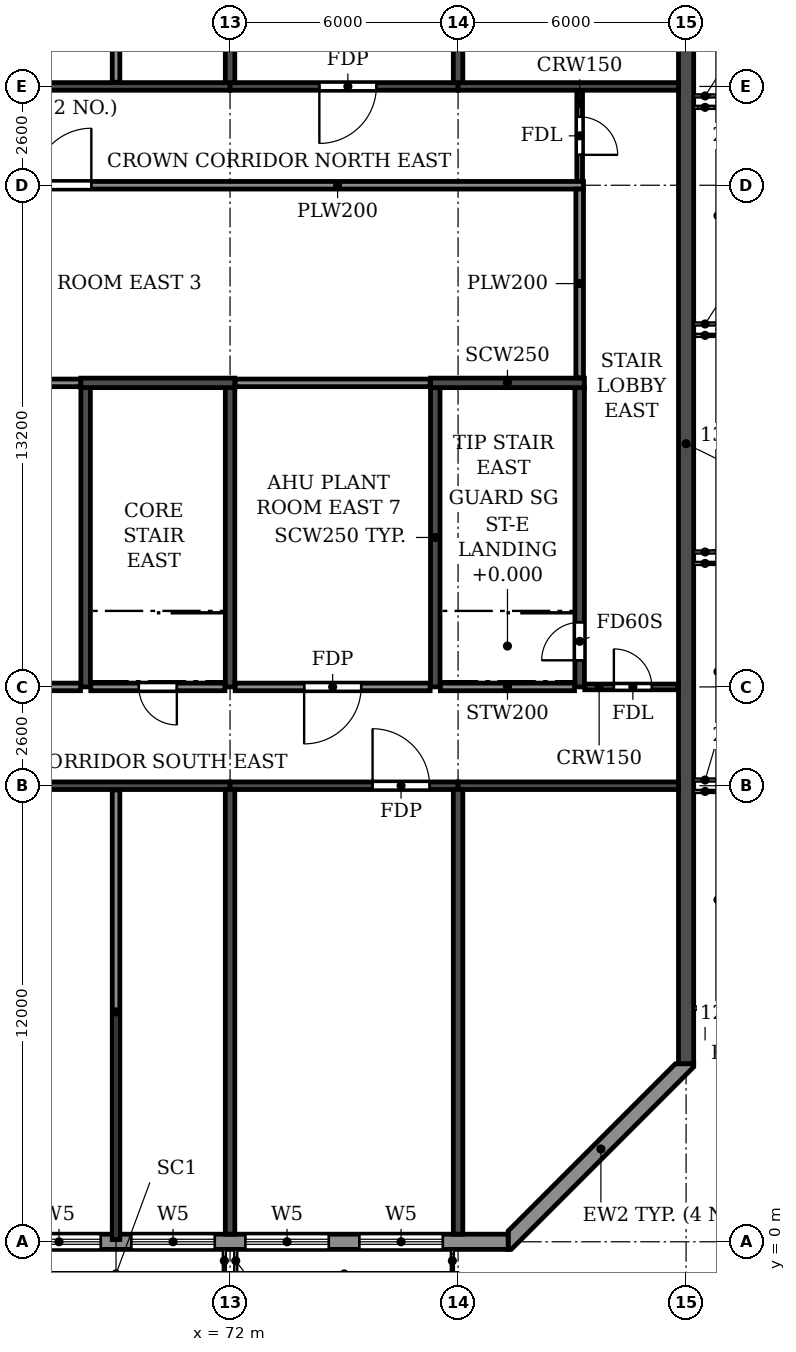
"""IFC4 building model, lengths in metres.
Left out: names, types, materials, properties, quantities, classifications, styles, units other than length and angle.
Written with IfcOpenShell. Run it as: python <this file> out.ifc"""

import sys

from ifc_helpers import new_model, si_unit, direction, frame, frame_2d, origin, place, context, subcontext, project, spatial, polyline, rectangle, outline, extrude, element, fill, save


model = new_model("IFC4")
c1 = context("Model", 3, precision=1e-05, world=origin(), true_north=direction((0.0, 1.0)))
c2 = subcontext(c1, "Body", "Model", "MODEL_VIEW")
j1 = project(units=[si_unit("LENGTHUNIT", "METRE"), si_unit("PLANEANGLEUNIT", "RADIAN")], contexts=[c1])
p1 = place(None, origin())
s1 = spatial("IfcSite", under=j1, at=p1, CompositionType="ELEMENT")
p2 = place(p1, origin())
s2 = spatial("IfcBuilding", under=s1, at=p2, CompositionType="ELEMENT")
p3 = place(p2, frame((0.0, 0.0, 282.3)))
s3 = spatial("IfcBuildingStorey", under=s2, at=p3, CompositionType="ELEMENT", Elevation=282.3)
p4 = place(p3, frame((72.0, 0.2, 0.0), z_axis=(0.0, 0.0, 1.0), x_axis=(0.0, 1.0, 0.0)))
e1 = element("IfcWall", 1, at=p4, inside=s3, PredefinedType="SHEAR", context=c2, shape_type="SweptSolid", body=[
    extrude(rectangle(XDim=11.7, YDim=0.25, at=frame_2d((5.85, 0.0))), origin(), (0.0, 0.0, 1.0), 3.05),
])
p5 = place(p3, frame((72.0, 30.5, 0.0), z_axis=(0.0, 0.0, 1.0), x_axis=(0.0, 1.0, 0.0)))
e2 = element("IfcWall", 2, at=p5, inside=s3, PredefinedType="SHEAR", context=c2, shape_type="SweptSolid", body=[
    extrude(rectangle(XDim=10.5, YDim=0.25, at=frame_2d((5.25, 0.0))), origin(), (0.0, 0.0, 1.0), 3.05),
])
p6 = place(p3, frame((78.0, 0.2, 0.0), z_axis=(0.0, 0.0, 1.0), x_axis=(0.0, 1.0, 0.0)))
e3 = element("IfcWall", 3, at=p6, inside=s3, PredefinedType="SHEAR", context=c2, shape_type="SweptSolid", body=[
    extrude(rectangle(XDim=11.7, YDim=0.25, at=frame_2d((5.85, 0.0))), origin(), (0.0, 0.0, 1.0), 3.05),
])
p7 = place(p3, frame((78.0, 30.5, 0.0), z_axis=(0.0, 0.0, 1.0), x_axis=(0.0, 1.0, 0.0)))
e4 = element("IfcWall", 4, at=p7, inside=s3, PredefinedType="SHEAR", context=c2, shape_type="SweptSolid", body=[
    extrude(rectangle(XDim=10.5, YDim=0.25, at=frame_2d((5.25, 0.0))), origin(), (0.0, 0.0, 1.0), 3.05),
])
p8 = place(p3, frame((84.0, 4.683, 0.0), z_axis=(0.0, 0.0, 1.0), x_axis=(0.0, 1.0, 0.0)))
e5 = element("IfcWall", 5, at=p8, inside=s3, PredefinedType="SHEAR", context=c2, shape_type="SweptSolid", body=[
    extrude(rectangle(XDim=31.834, YDim=0.4, at=frame_2d((15.917, 0.0))), origin(), (0.0, 0.0, 1.0), 3.05),
])
p9 = place(p3, frame((66.0, 12.0, 0.0), z_axis=(0.0, 0.0, 1.0), x_axis=(1.0, 0.0, 0.0)))
e6 = element("IfcWall", 6, at=p9, inside=s3, PredefinedType="SHEAR", context=c2, shape_type="SweptSolid", body=[
    extrude(rectangle(XDim=6.0, YDim=0.2, at=frame_2d((3.0, 0.0))), origin(), (0.0, 0.0, 1.0), 2.45),
])
p10 = place(p3, frame((72.0, 12.0, 0.0), z_axis=(0.0, 0.0, 1.0), x_axis=(1.0, 0.0, 0.0)))
e7 = element("IfcWall", 7, at=p10, inside=s3, PredefinedType="SHEAR", context=c2, shape_type="SweptSolid", body=[
    extrude(rectangle(XDim=6.0, YDim=0.2, at=frame_2d((3.0, 0.0))), origin(), (0.0, 0.0, 1.0), 2.45),
])
p11 = place(p10, frame((3.75, 0.0, 0.0)))
e8 = element("IfcOpeningElement", 8, at=p11, cuts=e7, PredefinedType="OPENING", context=c2, shape_type="SweptSolid", body=[
    extrude(rectangle(XDim=1.5, YDim=2.1, at=frame_2d((0.75, 1.05))), frame((0.0, 0.11, 0.0), z_axis=(0.0, -1.0, 0.0), x_axis=(1.0, 0.0, 0.0)), (0.0, 0.0, 1.0), 0.22),
])
p12 = place(p3, frame((78.0, 12.0, 0.0), z_axis=(0.0, 0.0, 1.0), x_axis=(1.0, 0.0, 0.0)))
e9 = element("IfcWall", 9, at=p12, inside=s3, PredefinedType="SHEAR", context=c2, shape_type="SweptSolid", body=[
    extrude(rectangle(XDim=5.8, YDim=0.2, at=frame_2d((2.9, 0.0))), origin(), (0.0, 0.0, 1.0), 2.45),
])
p13 = place(p3, frame((66.0, 30.4, 0.0), z_axis=(0.0, 0.0, 1.0), x_axis=(1.0, 0.0, 0.0)))
e10 = element("IfcWall", 10, at=p13, inside=s3, PredefinedType="SHEAR", context=c2, shape_type="SweptSolid", body=[
    extrude(rectangle(XDim=6.0, YDim=0.2, at=frame_2d((3.0, 0.0))), origin(), (0.0, 0.0, 1.0), 2.45),
])
p14 = place(p3, frame((72.0, 30.4, 0.0), z_axis=(0.0, 0.0, 1.0), x_axis=(1.0, 0.0, 0.0)))
e11 = element("IfcWall", 11, at=p14, inside=s3, PredefinedType="SHEAR", context=c2, shape_type="SweptSolid", body=[
    extrude(rectangle(XDim=6.0, YDim=0.2, at=frame_2d((3.0, 0.0))), origin(), (0.0, 0.0, 1.0), 2.45),
])
p15 = place(p14, frame((2.35, 0.0, 0.0)))
e12 = element("IfcOpeningElement", 12, at=p15, cuts=e11, PredefinedType="OPENING", context=c2, shape_type="SweptSolid", body=[
    extrude(rectangle(XDim=1.5, YDim=2.1, at=frame_2d((0.75, 1.05))), frame((0.0, 0.11, 0.0), z_axis=(0.0, -1.0, 0.0), x_axis=(1.0, 0.0, 0.0)), (0.0, 0.0, 1.0), 0.22),
])
p16 = place(p3, frame((78.0, 30.4, 0.0), z_axis=(0.0, 0.0, 1.0), x_axis=(1.0, 0.0, 0.0)))
e13 = element("IfcWall", 13, at=p16, inside=s3, PredefinedType="SHEAR", context=c2, shape_type="SweptSolid", body=[
    extrude(rectangle(XDim=5.8, YDim=0.2, at=frame_2d((2.9, 0.0))), origin(), (0.0, 0.0, 1.0), 2.45),
])
p17 = place(p3, frame((77.4, 14.6, 0.0), z_axis=(0.0, 0.0, 1.0), x_axis=(0.0, 1.0, 0.0)))
e14 = element("IfcWall", 14, at=p17, inside=s3, PredefinedType="SOLIDWALL", context=c2, shape_type="SweptSolid", body=[
    extrude(rectangle(XDim=7.875, YDim=0.25, at=frame_2d((3.938, 0.0))), origin(), (0.0, 0.0, 1.0), 3.05),
])
p18 = place(p3, frame((81.2, 14.6, 0.0), z_axis=(0.0, 0.0, 1.0), x_axis=(0.0, 1.0, 0.0)))
e15 = element("IfcWall", 15, at=p18, inside=s3, PredefinedType="SOLIDWALL", context=c2, shape_type="SweptSolid", body=[
    extrude(rectangle(XDim=7.875, YDim=0.25, at=frame_2d((3.938, 0.0))), origin(), (0.0, 0.0, 1.0), 3.05),
])
p19 = place(p18, frame((0.7, 0.0, 0.0)))
e16 = element("IfcOpeningElement", 16, at=p19, cuts=e15, PredefinedType="OPENING", context=c2, shape_type="SweptSolid", body=[
    extrude(rectangle(XDim=1.0, YDim=2.1, at=frame_2d((0.5, 1.05))), frame((0.0, 0.135, 0.0), z_axis=(0.0, -1.0, 0.0), x_axis=(1.0, 0.0, 0.0)), (0.0, 0.0, 1.0), 0.27),
])
p20 = place(p3, frame((77.275, 22.6, 0.0), z_axis=(0.0, 0.0, 1.0), x_axis=(1.0, 0.0, 0.0)))
e17 = element("IfcWall", 17, at=p20, inside=s3, PredefinedType="SOLIDWALL", context=c2, shape_type="SweptSolid", body=[
    extrude(rectangle(XDim=4.05, YDim=0.25, at=frame_2d((2.025, 0.0))), origin(), (0.0, 0.0, 1.0), 3.05),
])
for number, where, z_axis, x_axis in (
    (18, (68.2, 14.6, 0.0), (0.0, 0.0, 1.0), (0.0, 1.0, 0.0)),
    (19, (72.0, 14.6, 0.0), (0.0, 0.0, 1.0), (0.0, 1.0, 0.0)),
):
    element("IfcWall", number, at=place(p3, frame(where, z_axis=z_axis, x_axis=x_axis)), inside=s3, PredefinedType="SOLIDWALL", context=c2, shape_type="SweptSolid", body=[
        extrude(rectangle(XDim=7.875, YDim=0.25, at=frame_2d((3.938, 0.0))), origin(), (0.0, 0.0, 1.0), 3.05),
    ])
p21 = place(p3, frame((68.075, 22.6, 0.0), z_axis=(0.0, 0.0, 1.0), x_axis=(1.0, 0.0, 0.0)))
e20 = element("IfcWall", 20, at=p21, inside=s3, PredefinedType="SOLIDWALL", context=c2, shape_type="SweptSolid", body=[
    extrude(rectangle(XDim=4.05, YDim=0.25, at=frame_2d((2.025, 0.0))), origin(), (0.0, 0.0, 1.0), 3.05),
])
p22 = place(p3, frame((53.8, 0.0, 0.0), z_axis=(0.0, 0.0, 1.0), x_axis=(1.0, 0.0, 0.0)))
e21 = element("IfcWall", 21, at=p22, inside=s3, PredefinedType="STANDARD", context=c2, shape_type="SweptSolid", body=[
    extrude(rectangle(XDim=25.517, YDim=0.4, at=frame_2d((12.759, 0.0))), origin(), (0.0, 0.0, 1.0), 3.05),
])
p23 = place(p22, frame((0.6, 0.0, 0.6)))
e22 = element("IfcOpeningElement", 22, at=p23, cuts=e21, PredefinedType="OPENING", context=c2, shape_type="SweptSolid", body=[
    extrude(rectangle(XDim=2.2, YDim=2.4, at=frame_2d((1.1, 1.2))), frame((0.0, 0.21, 0.0), z_axis=(0.0, -1.0, 0.0), x_axis=(1.0, 0.0, 0.0)), (0.0, 0.0, 1.0), 0.42),
])
p24 = place(p22, frame((3.6, 0.0, 0.6)))
e23 = element("IfcOpeningElement", 23, at=p24, cuts=e21, PredefinedType="OPENING", context=c2, shape_type="SweptSolid", body=[
    extrude(rectangle(XDim=2.2, YDim=2.4, at=frame_2d((1.1, 1.2))), frame((0.0, 0.21, 0.0), z_axis=(0.0, -1.0, 0.0), x_axis=(1.0, 0.0, 0.0)), (0.0, 0.0, 1.0), 0.42),
])
p25 = place(p22, frame((6.6, 0.0, 0.6)))
e24 = element("IfcOpeningElement", 24, at=p25, cuts=e21, PredefinedType="OPENING", context=c2, shape_type="SweptSolid", body=[
    extrude(rectangle(XDim=2.2, YDim=2.4, at=frame_2d((1.1, 1.2))), frame((0.0, 0.21, 0.0), z_axis=(0.0, -1.0, 0.0), x_axis=(1.0, 0.0, 0.0)), (0.0, 0.0, 1.0), 0.42),
])
p26 = place(p22, frame((9.6, 0.0, 0.6)))
e25 = element("IfcOpeningElement", 25, at=p26, cuts=e21, PredefinedType="OPENING", context=c2, shape_type="SweptSolid", body=[
    extrude(rectangle(XDim=2.2, YDim=2.4, at=frame_2d((1.1, 1.2))), frame((0.0, 0.21, 0.0), z_axis=(0.0, -1.0, 0.0), x_axis=(1.0, 0.0, 0.0)), (0.0, 0.0, 1.0), 0.42),
])
p27 = place(p22, frame((12.6, 0.0, 0.6)))
e26 = element("IfcOpeningElement", 26, at=p27, cuts=e21, PredefinedType="OPENING", context=c2, shape_type="SweptSolid", body=[
    extrude(rectangle(XDim=2.2, YDim=2.4, at=frame_2d((1.1, 1.2))), frame((0.0, 0.21, 0.0), z_axis=(0.0, -1.0, 0.0), x_axis=(1.0, 0.0, 0.0)), (0.0, 0.0, 1.0), 0.42),
])
p28 = place(p22, frame((15.6, 0.0, 0.6)))
e27 = element("IfcOpeningElement", 27, at=p28, cuts=e21, PredefinedType="OPENING", context=c2, shape_type="SweptSolid", body=[
    extrude(rectangle(XDim=2.2, YDim=2.4, at=frame_2d((1.1, 1.2))), frame((0.0, 0.21, 0.0), z_axis=(0.0, -1.0, 0.0), x_axis=(1.0, 0.0, 0.0)), (0.0, 0.0, 1.0), 0.42),
])
p29 = place(p22, frame((18.6, 0.0, 0.6)))
e28 = element("IfcOpeningElement", 28, at=p29, cuts=e21, PredefinedType="OPENING", context=c2, shape_type="SweptSolid", body=[
    extrude(rectangle(XDim=2.2, YDim=2.4, at=frame_2d((1.1, 1.2))), frame((0.0, 0.21, 0.0), z_axis=(0.0, -1.0, 0.0), x_axis=(1.0, 0.0, 0.0)), (0.0, 0.0, 1.0), 0.42),
])
p30 = place(p22, frame((21.6, 0.0, 0.6)))
e29 = element("IfcOpeningElement", 29, at=p30, cuts=e21, PredefinedType="OPENING", context=c2, shape_type="SweptSolid", body=[
    extrude(rectangle(XDim=2.2, YDim=2.4, at=frame_2d((1.1, 1.2))), frame((0.0, 0.21, 0.0), z_axis=(0.0, -1.0, 0.0), x_axis=(1.0, 0.0, 0.0)), (0.0, 0.0, 1.0), 0.42),
])
p31 = place(p3, origin())
e30 = element("IfcWall", 30, at=p31, inside=s3, PredefinedType="STANDARD", context=c2, shape_type="SweptSolid", body=[
    extrude(outline(polyline([(79.317, -0.2), (79.4, -0.2), (84.2, 4.6), (84.2, 4.683), (83.717, 4.683), (79.317, 0.283), (79.317, -0.2)])), origin(), (0.0, 0.0, 1.0), 3.05),
])
p32 = place(p3, frame((81.335, 14.6, 0.0), z_axis=(0.0, 0.0, 1.0), x_axis=(1.0, 0.0, 0.0)))
e31 = element("IfcWall", 31, at=p32, inside=s3, PredefinedType="PARTITIONING", context=c2, shape_type="SweptSolid", body=[
    extrude(rectangle(XDim=2.455, YDim=0.15, at=frame_2d((1.228, 0.0))), origin(), (0.0, 0.0, 1.0), 3.05),
])
p33 = place(p32, frame((0.765, 0.0, 0.0)))
e32 = element("IfcOpeningElement", 32, at=p33, cuts=e31, PredefinedType="OPENING", context=c2, shape_type="SweptSolid", body=[
    extrude(rectangle(XDim=1.0, YDim=2.1, at=frame_2d((0.5, 1.05))), frame((0.0, 0.085, 0.0), z_axis=(0.0, -1.0, 0.0), x_axis=(1.0, 0.0, 0.0)), (0.0, 0.0, 1.0), 0.17),
])
p34 = place(p3, frame((81.2, 27.9, 0.0), z_axis=(0.0, 0.0, 1.0), x_axis=(0.0, 1.0, 0.0)))
e33 = element("IfcWall", 33, at=p34, inside=s3, PredefinedType="PARTITIONING", context=c2, shape_type="SweptSolid", body=[
    extrude(rectangle(XDim=2.39, YDim=0.15, at=frame_2d((1.195, 0.0))), origin(), (0.0, 0.0, 1.0), 3.05),
])
p35 = place(p34, frame((0.7, 0.0, 0.0)))
e34 = element("IfcOpeningElement", 34, at=p35, cuts=e33, PredefinedType="OPENING", context=c2, shape_type="SweptSolid", body=[
    extrude(rectangle(XDim=1.0, YDim=2.1, at=frame_2d((0.5, 1.05))), frame((0.0, 0.085, 0.0), z_axis=(0.0, -1.0, 0.0), x_axis=(1.0, 0.0, 0.0)), (0.0, 0.0, 1.0), 0.17),
])
p36 = place(p3, frame((54.21, 14.6, 0.0), z_axis=(0.0, 0.0, 1.0), x_axis=(1.0, 0.0, 0.0)))
e35 = element("IfcWall", 35, at=p36, inside=s3, PredefinedType="PARTITIONING", context=c2, shape_type="SweptSolid", body=[
    extrude(rectangle(XDim=13.855, YDim=0.2, at=frame_2d((6.927, 0.0))), origin(), (0.0, 0.0, 1.0), 3.05),
])
p37 = place(p36, frame((6.14, 0.0, 0.0)))
e36 = element("IfcOpeningElement", 36, at=p37, cuts=e35, PredefinedType="OPENING", context=c2, shape_type="SweptSolid", body=[
    extrude(rectangle(XDim=1.5, YDim=2.1, at=frame_2d((0.75, 1.05))), frame((0.0, 0.11, 0.0), z_axis=(0.0, -1.0, 0.0), x_axis=(1.0, 0.0, 0.0)), (0.0, 0.0, 1.0), 0.22),
])
p38 = place(p3, frame((72.135, 14.6, 0.0), z_axis=(0.0, 0.0, 1.0), x_axis=(1.0, 0.0, 0.0)))
e37 = element("IfcWall", 37, at=p38, inside=s3, PredefinedType="PARTITIONING", context=c2, shape_type="SweptSolid", body=[
    extrude(rectangle(XDim=5.13, YDim=0.2, at=frame_2d((2.565, 0.0))), origin(), (0.0, 0.0, 1.0), 3.05),
])
p39 = place(p38, frame((1.815, 0.0, 0.0)))
e38 = element("IfcOpeningElement", 38, at=p39, cuts=e37, PredefinedType="OPENING", context=c2, shape_type="SweptSolid", body=[
    extrude(rectangle(XDim=1.5, YDim=2.1, at=frame_2d((0.75, 1.05))), frame((0.0, 0.11, 0.0), z_axis=(0.0, -1.0, 0.0), x_axis=(1.0, 0.0, 0.0)), (0.0, 0.0, 1.0), 0.22),
])
p40 = place(p3, frame((54.21, 22.6, 0.0), z_axis=(0.0, 0.0, 1.0), x_axis=(1.0, 0.0, 0.0)))
e39 = element("IfcWall", 39, at=p40, inside=s3, PredefinedType="PARTITIONING", context=c2, shape_type="SweptSolid", body=[
    extrude(rectangle(XDim=13.855, YDim=0.2, at=frame_2d((6.927, 0.0))), origin(), (0.0, 0.0, 1.0), 3.05),
])
p41 = place(p3, frame((72.135, 22.6, 0.0), z_axis=(0.0, 0.0, 1.0), x_axis=(1.0, 0.0, 0.0)))
e40 = element("IfcWall", 40, at=p41, inside=s3, PredefinedType="PARTITIONING", context=c2, shape_type="SweptSolid", body=[
    extrude(rectangle(XDim=5.13, YDim=0.2, at=frame_2d((2.565, 0.0))), origin(), (0.0, 0.0, 1.0), 3.05),
])
p42 = place(p3, frame((54.21, 27.8, 0.0), z_axis=(0.0, 0.0, 1.0), x_axis=(1.0, 0.0, 0.0)))
e41 = element("IfcWall", 41, at=p42, inside=s3, PredefinedType="PARTITIONING", context=c2, shape_type="SweptSolid", body=[
    extrude(rectangle(XDim=27.09, YDim=0.2, at=frame_2d((13.545, 0.0))), origin(), (0.0, 0.0, 1.0), 3.05),
])
p43 = place(p42, frame((12.64, 0.0, 0.0)))
e42 = element("IfcOpeningElement", 42, at=p43, cuts=e41, PredefinedType="OPENING", context=c2, shape_type="SweptSolid", body=[
    extrude(rectangle(XDim=1.5, YDim=2.1, at=frame_2d((0.75, 1.05))), frame((0.0, 0.11, 0.0), z_axis=(0.0, -1.0, 0.0), x_axis=(1.0, 0.0, 0.0)), (0.0, 0.0, 1.0), 0.22),
])
p44 = place(p3, frame((69.0, 0.06, 0.0), z_axis=(0.0, 0.0, 1.0), x_axis=(0.0, 1.0, 0.0)))
e43 = element("IfcWall", 43, at=p44, inside=s3, PredefinedType="PARTITIONING", context=c2, shape_type="SweptSolid", body=[
    extrude(rectangle(XDim=11.83, YDim=0.2, at=frame_2d((5.915, 0.0))), origin(), (0.0, 0.0, 1.0), 3.05),
])
p45 = place(p3, frame((69.0, 30.51, 0.0), z_axis=(0.0, 0.0, 1.0), x_axis=(0.0, 1.0, 0.0)))
e44 = element("IfcWall", 44, at=p45, inside=s3, PredefinedType="PARTITIONING", context=c2, shape_type="SweptSolid", body=[
    extrude(rectangle(XDim=10.63, YDim=0.2, at=frame_2d((5.315, 0.0))), origin(), (0.0, 0.0, 1.0), 3.05),
])
p46 = place(p3, frame((81.2, 22.735, 0.0), z_axis=(0.0, 0.0, 1.0), x_axis=(0.0, 1.0, 0.0)))
e45 = element("IfcWall", 45, at=p46, inside=s3, PredefinedType="PARTITIONING", context=c2, shape_type="SweptSolid", body=[
    extrude(rectangle(XDim=4.965, YDim=0.2, at=frame_2d((2.482, 0.0))), origin(), (0.0, 0.0, 1.0), 3.05),
])
p47 = place(p3, frame((68.335, 14.6, 0.0), z_axis=(0.0, 0.0, 1.0), x_axis=(1.0, 0.0, 0.0)))
e46 = element("IfcWall", 46, at=p47, inside=s3, PredefinedType="PARTITIONING", context=c2, shape_type="SweptSolid", body=[
    extrude(rectangle(XDim=3.53, YDim=0.2, at=frame_2d((1.765, 0.0))), origin(), (0.0, 0.0, 1.0), 3.05),
])
p48 = place(p47, frame((1.265, 0.0, 0.0)))
e47 = element("IfcOpeningElement", 47, at=p48, cuts=e46, PredefinedType="OPENING", context=c2, shape_type="SweptSolid", body=[
    extrude(rectangle(XDim=1.0, YDim=2.1, at=frame_2d((0.5, 1.05))), frame((0.0, 0.11, 0.0), z_axis=(0.0, -1.0, 0.0), x_axis=(1.0, 0.0, 0.0)), (0.0, 0.0, 1.0), 0.22),
])
p49 = place(p3, frame((77.535, 14.6, 0.0), z_axis=(0.0, 0.0, 1.0), x_axis=(1.0, 0.0, 0.0)))
e48 = element("IfcWall", 48, at=p49, inside=s3, PredefinedType="PARTITIONING", context=c2, shape_type="SweptSolid", body=[
    extrude(rectangle(XDim=3.53, YDim=0.2, at=frame_2d((1.765, 0.0))), origin(), (0.0, 0.0, 1.0), 3.05),
])
p50 = place(p27, origin())
e49 = element("IfcWindow", 49, at=p50, inside=s3, PartitioningType="TRIPLE_PANEL_HORIZONTAL", PredefinedType="WINDOW", context=c2, shape_type="SweptSolid", body=[
    extrude(rectangle(XDim=2.2, YDim=2.4, at=frame_2d((1.1, 1.2))), frame((0.0, 0.03, 0.0), z_axis=(0.0, -1.0, 0.0), x_axis=(1.0, 0.0, 0.0)), (0.0, 0.0, 1.0), 0.06),
])
fill(e26, e49)
p51 = place(p28, origin())
e50 = element("IfcWindow", 50, at=p51, inside=s3, PartitioningType="TRIPLE_PANEL_HORIZONTAL", PredefinedType="WINDOW", context=c2, shape_type="SweptSolid", body=[
    extrude(rectangle(XDim=2.2, YDim=2.4, at=frame_2d((1.1, 1.2))), frame((0.0, 0.03, 0.0), z_axis=(0.0, -1.0, 0.0), x_axis=(1.0, 0.0, 0.0)), (0.0, 0.0, 1.0), 0.06),
])
fill(e27, e50)
p52 = place(p29, origin())
e51 = element("IfcWindow", 51, at=p52, inside=s3, PartitioningType="TRIPLE_PANEL_HORIZONTAL", PredefinedType="WINDOW", context=c2, shape_type="SweptSolid", body=[
    extrude(rectangle(XDim=2.2, YDim=2.4, at=frame_2d((1.1, 1.2))), frame((0.0, 0.03, 0.0), z_axis=(0.0, -1.0, 0.0), x_axis=(1.0, 0.0, 0.0)), (0.0, 0.0, 1.0), 0.06),
])
fill(e28, e51)
p53 = place(p30, origin())
e52 = element("IfcWindow", 52, at=p53, inside=s3, PartitioningType="TRIPLE_PANEL_HORIZONTAL", PredefinedType="WINDOW", context=c2, shape_type="SweptSolid", body=[
    extrude(rectangle(XDim=2.2, YDim=2.4, at=frame_2d((1.1, 1.2))), frame((0.0, 0.03, 0.0), z_axis=(0.0, -1.0, 0.0), x_axis=(1.0, 0.0, 0.0)), (0.0, 0.0, 1.0), 0.06),
])
fill(e29, e52)
p54 = place(p43, origin())
e53 = element("IfcDoor", 53, at=p54, inside=s3, OperationType="DOUBLE_DOOR_SINGLE_SWING", PredefinedType="DOOR", context=c2, shape_type="SweptSolid", body=[
    extrude(rectangle(XDim=1.5, YDim=2.1, at=frame_2d((0.75, 1.05))), frame((0.0, 0.025, 0.0), z_axis=(0.0, -1.0, 0.0), x_axis=(1.0, 0.0, 0.0)), (0.0, 0.0, 1.0), 0.05),
])
fill(e42, e53)
p55 = place(p15, frame((1.5, 0.0, 0.0), z_axis=(0.0, 0.0, 1.0), x_axis=(-1.0, 0.0, 0.0)))
e54 = element("IfcDoor", 54, at=p55, inside=s3, OperationType="DOUBLE_DOOR_SINGLE_SWING", PredefinedType="DOOR", context=c2, shape_type="SweptSolid", body=[
    extrude(rectangle(XDim=1.5, YDim=2.1, at=frame_2d((0.75, 1.05))), frame((0.0, 0.025, 0.0), z_axis=(0.0, -1.0, 0.0), x_axis=(1.0, 0.0, 0.0)), (0.0, 0.0, 1.0), 0.05),
])
fill(e12, e54)
p56 = place(p39, frame((1.5, 0.0, 0.0), z_axis=(0.0, 0.0, 1.0), x_axis=(-1.0, 0.0, 0.0)))
e55 = element("IfcDoor", 55, at=p56, inside=s3, OperationType="DOUBLE_DOOR_SINGLE_SWING", PredefinedType="DOOR", context=c2, shape_type="SweptSolid", body=[
    extrude(rectangle(XDim=1.5, YDim=2.1, at=frame_2d((0.75, 1.05))), frame((0.0, 0.025, 0.0), z_axis=(0.0, -1.0, 0.0), x_axis=(1.0, 0.0, 0.0)), (0.0, 0.0, 1.0), 0.05),
])
fill(e38, e55)
p57 = place(p11, origin())
e56 = element("IfcDoor", 56, at=p57, inside=s3, OperationType="DOUBLE_DOOR_SINGLE_SWING", PredefinedType="DOOR", context=c2, shape_type="SweptSolid", body=[
    extrude(rectangle(XDim=1.5, YDim=2.1, at=frame_2d((0.75, 1.05))), frame((0.0, 0.025, 0.0), z_axis=(0.0, -1.0, 0.0), x_axis=(1.0, 0.0, 0.0)), (0.0, 0.0, 1.0), 0.05),
])
fill(e8, e56)
p58 = place(p19, origin())
e57 = element("IfcDoor", 57, at=p58, inside=s3, OperationType="SINGLE_SWING_LEFT", PredefinedType="DOOR", context=c2, shape_type="SweptSolid", body=[
    extrude(rectangle(XDim=1.0, YDim=2.1, at=frame_2d((0.5, 1.05))), frame((0.0, 0.025, 0.0), z_axis=(0.0, -1.0, 0.0), x_axis=(1.0, 0.0, 0.0)), (0.0, 0.0, 1.0), 0.05),
])
fill(e16, e57)
p59 = place(p35, frame((1.0, 0.0, 0.0), z_axis=(0.0, 0.0, 1.0), x_axis=(-1.0, 0.0, 0.0)))
e58 = element("IfcDoor", 58, at=p59, inside=s3, OperationType="SINGLE_SWING_RIGHT", PredefinedType="DOOR", context=c2, shape_type="SweptSolid", body=[
    extrude(rectangle(XDim=1.0, YDim=2.1, at=frame_2d((0.5, 1.05))), frame((0.0, 0.025, 0.0), z_axis=(0.0, -1.0, 0.0), x_axis=(1.0, 0.0, 0.0)), (0.0, 0.0, 1.0), 0.05),
])
fill(e34, e58)
p60 = place(p33, origin())
e59 = element("IfcDoor", 59, at=p60, inside=s3, OperationType="SINGLE_SWING_LEFT", PredefinedType="DOOR", context=c2, shape_type="SweptSolid", body=[
    extrude(rectangle(XDim=1.0, YDim=2.1, at=frame_2d((0.5, 1.05))), frame((0.0, 0.025, 0.0), z_axis=(0.0, -1.0, 0.0), x_axis=(1.0, 0.0, 0.0)), (0.0, 0.0, 1.0), 0.05),
])
fill(e32, e59)
p61 = place(p48, frame((1.0, 0.0, 0.0), z_axis=(0.0, 0.0, 1.0), x_axis=(-1.0, 0.0, 0.0)))
e60 = element("IfcDoor", 60, at=p61, inside=s3, OperationType="SINGLE_SWING_LEFT", PredefinedType="DOOR", context=c2, shape_type="SweptSolid", body=[
    extrude(rectangle(XDim=1.0, YDim=2.1, at=frame_2d((0.5, 1.05))), frame((0.0, 0.025, 0.0), z_axis=(0.0, -1.0, 0.0), x_axis=(1.0, 0.0, 0.0)), (0.0, 0.0, 1.0), 0.05),
])
fill(e47, e60)
save(model, sys.argv[1])
